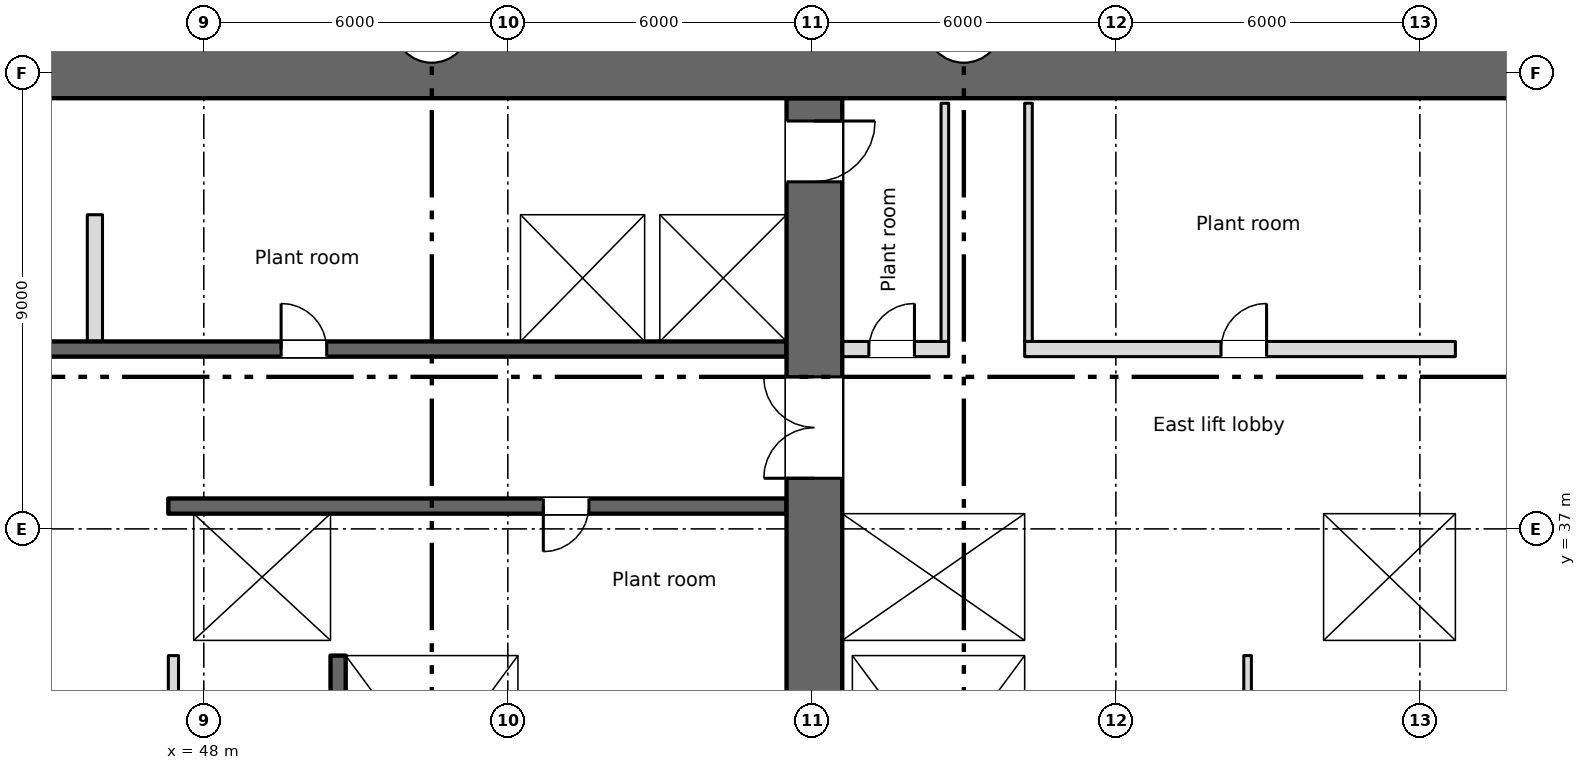
"""IFC4 building model, lengths in metres.
Left out: names, types, materials, properties, quantities, classifications, styles, units other than length and angle.
Written with IfcOpenShell. Run it as: python <this file> out.ifc"""

import sys

from ifc_helpers import new_model, si_unit, direction, frame, frame_2d, origin, place, context, subcontext, project, spatial, rectangle, extrude, element, fill, save


model = new_model("IFC4")
c1 = context("Model", 3, precision=1e-05, world=origin(), true_north=direction((0.0, 1.0)))
c2 = subcontext(c1, "Body", "Model", "MODEL_VIEW")
j1 = project(units=[si_unit("LENGTHUNIT", "METRE"), si_unit("PLANEANGLEUNIT", "RADIAN")], contexts=[c1])
p1 = place(None, origin())
s1 = spatial("IfcSite", under=j1, at=p1, CompositionType="ELEMENT")
p2 = place(p1, origin())
s2 = spatial("IfcBuilding", under=s1, at=p2, CompositionType="ELEMENT")
p3 = place(p2, frame((0.0, 0.0, -6.0)))
s3 = spatial("IfcBuildingStorey", under=s2, at=p3, CompositionType="ELEMENT", Elevation=-6.0)
p4 = place(p3, frame((-2.0, 46.0, 0.0), z_axis=(0.0, 0.0, 1.0), x_axis=(1.0, 0.0, 0.0)))
e1 = element("IfcWall", 1, at=p4, inside=s3, PredefinedType="SOLIDWALL", context=c2, shape_type="SweptSolid", body=[
    extrude(rectangle(XDim=82.0, YDim=1.0, at=frame_2d((41.0, 0.0))), origin(), (0.0, 0.0, 1.0), 5.55),
])
p5 = place(p3, frame((72.85, 28.4, 0.0), z_axis=(0.0, 0.0, 1.0), x_axis=(0.0, 1.0, 0.0)))
e2 = element("IfcWall", 2, at=p5, inside=s3, PredefinedType="SHEAR", context=c2, shape_type="SweptSolid", body=[
    extrude(rectangle(XDim=17.1, YDim=0.3, at=frame_2d((8.55, 0.0))), origin(), (0.0, 0.0, 1.0), 5.55),
])
p6 = place(p3, frame((64.35, 34.8, 0.0), z_axis=(0.0, 0.0, 1.0), x_axis=(0.0, 1.0, 0.0)))
e3 = element("IfcWall", 3, at=p6, inside=s3, PredefinedType="SHEAR", context=c2, shape_type="SweptSolid", body=[
    extrude(rectangle(XDim=2.5, YDim=0.3, at=frame_2d((1.25, 0.0))), origin(), (0.0, 0.0, 1.0), 5.55),
])
p7 = place(p3, frame((60.05, 28.4, 0.0), z_axis=(0.0, 0.0, 1.0), x_axis=(0.0, 1.0, 0.0)))
e4 = element("IfcWall", 4, at=p7, inside=s3, PredefinedType="SHEAR", context=c2, shape_type="SweptSolid", body=[
    extrude(rectangle(XDim=17.1, YDim=1.1, at=frame_2d((8.55, 0.0))), origin(), (0.0, 0.0, 1.0), 5.55),
])
p8 = place(p7, frame((9.6, 0.0, 0.0)))
e5 = element("IfcOpeningElement", 5, at=p8, cuts=e4, PredefinedType="OPENING", context=c2, shape_type="SweptSolid", body=[
    extrude(rectangle(XDim=2.0, YDim=2.1, at=frame_2d((1.0, 1.05))), frame((0.0, 0.56, 0.0), z_axis=(0.0, -1.0, 0.0), x_axis=(1.0, 0.0, 0.0)), (0.0, 0.0, 1.0), 1.12),
])
p9 = place(p7, frame((15.45, 0.0, 0.0)))
e6 = element("IfcOpeningElement", 6, at=p9, cuts=e4, PredefinedType="OPENING", context=c2, shape_type="SweptSolid", body=[
    extrude(rectangle(XDim=1.2, YDim=2.1, at=frame_2d((0.6, 1.05))), frame((0.0, 0.56, 0.0), z_axis=(0.0, -1.0, 0.0), x_axis=(1.0, 0.0, 0.0)), (0.0, 0.0, 1.0), 1.12),
])
p10 = place(p3, frame((50.65, 34.5, 0.0), z_axis=(0.0, 0.0, 1.0), x_axis=(0.0, -1.0, 0.0)))
e7 = element("IfcWall", 7, at=p10, inside=s3, PredefinedType="SHEAR", context=c2, shape_type="SweptSolid", body=[
    extrude(rectangle(XDim=6.1, YDim=0.3, at=frame_2d((3.05, 0.0))), origin(), (0.0, 0.0, 1.0), 5.55),
])
p11 = place(p10, frame((4.95, 0.0, 0.0)))
e8 = element("IfcOpeningElement", 8, at=p11, cuts=e7, PredefinedType="OPENING", context=c2, shape_type="SweptSolid", body=[
    extrude(rectangle(XDim=1.1, YDim=2.1, at=frame_2d((0.55, 1.05))), frame((0.0, 0.16, 0.0), z_axis=(0.0, -1.0, 0.0), x_axis=(1.0, 0.0, 0.0)), (0.0, 0.0, 1.0), 0.32),
])
p12 = place(p3, frame((54.35, 28.4, 0.0), z_axis=(0.0, 0.0, 1.0), x_axis=(0.0, 1.0, 0.0)))
e9 = element("IfcWall", 9, at=p12, inside=s3, PredefinedType="SHEAR", context=c2, shape_type="SweptSolid", body=[
    extrude(rectangle(XDim=6.1, YDim=0.3, at=frame_2d((3.05, 0.0))), origin(), (0.0, 0.0, 1.0), 5.55),
])
p13 = place(p3, frame((60.7, 28.4, 0.0), z_axis=(0.0, 0.0, 1.0), x_axis=(0.0, 1.0, 0.0)))
e10 = element("IfcWall", 10, at=p13, inside=s3, PredefinedType="SHEAR", context=c2, shape_type="SweptSolid", body=[
    extrude(rectangle(XDim=6.1, YDim=0.2, at=frame_2d((3.05, 0.0))), origin(), (0.0, 0.0, 1.0), 5.55),
])
p14 = place(p3, frame((64.35, 28.4, 0.0), z_axis=(0.0, 0.0, 1.0), x_axis=(0.0, 1.0, 0.0)))
e11 = element("IfcWall", 11, at=p14, inside=s3, PredefinedType="SHEAR", context=c2, shape_type="SweptSolid", body=[
    extrude(rectangle(XDim=6.1, YDim=0.3, at=frame_2d((3.05, 0.0))), origin(), (0.0, 0.0, 1.0), 5.55),
])
p15 = place(p3, frame((47.3, 34.65, 0.0), z_axis=(0.0, 0.0, 1.0), x_axis=(1.0, 0.0, 0.0)))
e12 = element("IfcWall", 12, at=p15, inside=s3, PredefinedType="SHEAR", context=c2, shape_type="SweptSolid", body=[
    extrude(rectangle(XDim=12.2, YDim=0.3, at=frame_2d((6.1, 0.0))), origin(), (0.0, 0.0, 1.0), 5.55),
])
p16 = place(p15, frame((1.3, 0.0, 0.0)))
e13 = element("IfcOpeningElement", 13, at=p16, cuts=e12, PredefinedType="OPENING", context=c2, shape_type="SweptSolid", body=[
    extrude(rectangle(XDim=1.1, YDim=2.1, at=frame_2d((0.55, 1.05))), frame((0.0, 0.16, 0.0), z_axis=(0.0, -1.0, 0.0), x_axis=(1.0, 0.0, 0.0)), (0.0, 0.0, 1.0), 0.32),
])
p17 = place(p3, frame((60.6, 34.65, 0.0), z_axis=(0.0, 0.0, 1.0), x_axis=(1.0, 0.0, 0.0)))
e14 = element("IfcWall", 14, at=p17, inside=s3, PredefinedType="SHEAR", context=c2, shape_type="SweptSolid", body=[
    extrude(rectangle(XDim=12.1, YDim=0.3, at=frame_2d((6.05, 0.0))), origin(), (0.0, 0.0, 1.0), 5.55),
])
p18 = place(p3, frame((59.5, 37.45, 0.0), z_axis=(0.0, 0.0, 1.0), x_axis=(-1.0, 0.0, 0.0)))
e15 = element("IfcWall", 15, at=p18, inside=s3, PredefinedType="SHEAR", context=c2, shape_type="SweptSolid", body=[
    extrude(rectangle(XDim=12.2, YDim=0.3, at=frame_2d((6.1, 0.0))), origin(), (0.0, 0.0, 1.0), 5.55),
])
p19 = place(p18, frame((3.9, 0.0, 0.0)))
e16 = element("IfcOpeningElement", 16, at=p19, cuts=e15, PredefinedType="OPENING", context=c2, shape_type="SweptSolid", body=[
    extrude(rectangle(XDim=0.9, YDim=2.1, at=frame_2d((0.45, 1.05))), frame((0.0, 0.16, 0.0), z_axis=(0.0, -1.0, 0.0), x_axis=(1.0, 0.0, 0.0)), (0.0, 0.0, 1.0), 0.32),
])
p20 = place(p3, frame((60.6, 37.45, 0.0), z_axis=(0.0, 0.0, 1.0), x_axis=(1.0, 0.0, 0.0)))
e17 = element("IfcWall", 17, at=p20, inside=s3, PredefinedType="SHEAR", context=c2, shape_type="SweptSolid", body=[
    extrude(rectangle(XDim=12.1, YDim=0.3, at=frame_2d((6.05, 0.0))), origin(), (0.0, 0.0, 1.0), 5.55),
])
p21 = place(p20, frame((1.25, 0.0, 0.0)))
e18 = element("IfcOpeningElement", 18, at=p21, cuts=e17, PredefinedType="OPENING", context=c2, shape_type="SweptSolid", body=[
    extrude(rectangle(XDim=1.1, YDim=2.1, at=frame_2d((0.55, 1.05))), frame((0.0, 0.16, 0.0), z_axis=(0.0, -1.0, 0.0), x_axis=(1.0, 0.0, 0.0)), (0.0, 0.0, 1.0), 0.32),
])
p22 = place(p20, frame((4.6, 0.0, 0.0)))
e19 = element("IfcOpeningElement", 19, at=p22, cuts=e17, PredefinedType="OPENING", context=c2, shape_type="SweptSolid", body=[
    extrude(rectangle(XDim=1.1, YDim=2.1, at=frame_2d((0.55, 1.05))), frame((0.0, 0.16, 0.0), z_axis=(0.0, -1.0, 0.0), x_axis=(1.0, 0.0, 0.0)), (0.0, 0.0, 1.0), 0.32),
])
p23 = place(p20, frame((7.4, 0.0, 0.0)))
e20 = element("IfcOpeningElement", 20, at=p23, cuts=e17, PredefinedType="OPENING", context=c2, shape_type="SweptSolid", body=[
    extrude(rectangle(XDim=1.1, YDim=2.1, at=frame_2d((0.55, 1.05))), frame((0.0, 0.16, 0.0), z_axis=(0.0, -1.0, 0.0), x_axis=(1.0, 0.0, 0.0)), (0.0, 0.0, 1.0), 0.32),
])
p24 = place(p20, frame((10.25, 0.0, 0.0)))
e21 = element("IfcOpeningElement", 21, at=p24, cuts=e17, PredefinedType="OPENING", context=c2, shape_type="SweptSolid", body=[
    extrude(rectangle(XDim=1.1, YDim=2.1, at=frame_2d((0.55, 1.05))), frame((0.0, 0.16, 0.0), z_axis=(0.0, -1.0, 0.0), x_axis=(1.0, 0.0, 0.0)), (0.0, 0.0, 1.0), 0.32),
])
p25 = place(p3, frame((47.55, 34.8, 0.0), z_axis=(0.0, 0.0, 1.0), x_axis=(0.0, 1.0, 0.0)))
e22 = element("IfcWall", 22, at=p25, inside=s3, PredefinedType="SHEAR", context=c2, shape_type="SweptSolid", body=[
    extrude(rectangle(XDim=2.5, YDim=0.5, at=frame_2d((1.25, 0.0))), origin(), (0.0, 0.0, 1.0), 5.55),
])
p26 = place(p3, frame((50.65, 34.8, 0.0), z_axis=(0.0, 0.0, 1.0), x_axis=(0.0, 1.0, 0.0)))
e23 = element("IfcWall", 23, at=p26, inside=s3, PredefinedType="SHEAR", context=c2, shape_type="SweptSolid", body=[
    extrude(rectangle(XDim=2.5, YDim=0.3, at=frame_2d((1.25, 0.0))), origin(), (0.0, 0.0, 1.0), 5.55),
])
p27 = place(p3, frame((18.5, 40.55, 0.0), z_axis=(0.0, 0.0, 1.0), x_axis=(1.0, 0.0, 0.0)))
e24 = element("IfcWall", 24, at=p27, inside=s3, PredefinedType="SHEAR", context=c2, shape_type="SweptSolid", body=[
    extrude(rectangle(XDim=41.0, YDim=0.3, at=frame_2d((20.5, 0.0))), origin(), (0.0, 0.0, 1.0), 5.55),
])
p28 = place(p27, frame((2.15, 0.0, 0.0)))
e25 = element("IfcOpeningElement", 25, at=p28, cuts=e24, PredefinedType="OPENING", context=c2, shape_type="SweptSolid", body=[
    extrude(rectangle(XDim=0.9, YDim=2.1, at=frame_2d((0.45, 1.05))), frame((0.0, 0.16, 0.0), z_axis=(0.0, -1.0, 0.0), x_axis=(1.0, 0.0, 0.0)), (0.0, 0.0, 1.0), 0.32),
])
p29 = place(p27, frame((7.65, 0.0, 0.0)))
e26 = element("IfcOpeningElement", 26, at=p29, cuts=e24, PredefinedType="OPENING", context=c2, shape_type="SweptSolid", body=[
    extrude(rectangle(XDim=0.9, YDim=2.1, at=frame_2d((0.45, 1.05))), frame((0.0, 0.16, 0.0), z_axis=(0.0, -1.0, 0.0), x_axis=(1.0, 0.0, 0.0)), (0.0, 0.0, 1.0), 0.32),
])
p30 = place(p27, frame((13.15, 0.0, 0.0)))
e27 = element("IfcOpeningElement", 27, at=p30, cuts=e24, PredefinedType="OPENING", context=c2, shape_type="SweptSolid", body=[
    extrude(rectangle(XDim=0.9, YDim=2.1, at=frame_2d((0.45, 1.05))), frame((0.0, 0.16, 0.0), z_axis=(0.0, -1.0, 0.0), x_axis=(1.0, 0.0, 0.0)), (0.0, 0.0, 1.0), 0.32),
])
p31 = place(p27, frame((18.65, 0.0, 0.0)))
e28 = element("IfcOpeningElement", 28, at=p31, cuts=e24, PredefinedType="OPENING", context=c2, shape_type="SweptSolid", body=[
    extrude(rectangle(XDim=0.9, YDim=2.1, at=frame_2d((0.45, 1.05))), frame((0.0, 0.16, 0.0), z_axis=(0.0, -1.0, 0.0), x_axis=(1.0, 0.0, 0.0)), (0.0, 0.0, 1.0), 0.32),
])
p32 = place(p27, frame((24.15, 0.0, 0.0)))
e29 = element("IfcOpeningElement", 29, at=p32, cuts=e24, PredefinedType="OPENING", context=c2, shape_type="SweptSolid", body=[
    extrude(rectangle(XDim=0.9, YDim=2.1, at=frame_2d((0.45, 1.05))), frame((0.0, 0.16, 0.0), z_axis=(0.0, -1.0, 0.0), x_axis=(1.0, 0.0, 0.0)), (0.0, 0.0, 1.0), 0.32),
])
p33 = place(p27, frame((31.025, 0.0, 0.0)))
e30 = element("IfcOpeningElement", 30, at=p33, cuts=e24, PredefinedType="OPENING", context=c2, shape_type="SweptSolid", body=[
    extrude(rectangle(XDim=0.9, YDim=2.1, at=frame_2d((0.45, 1.05))), frame((0.0, 0.16, 0.0), z_axis=(0.0, -1.0, 0.0), x_axis=(1.0, 0.0, 0.0)), (0.0, 0.0, 1.0), 0.32),
])
p34 = place(p27, frame((36.375, 0.0, 0.0)))
e31 = element("IfcOpeningElement", 31, at=p34, cuts=e24, PredefinedType="OPENING", context=c2, shape_type="SweptSolid", body=[
    extrude(rectangle(XDim=1.2, YDim=2.1, at=frame_2d((0.6, 1.05))), frame((0.0, 0.16, 0.0), z_axis=(0.0, -1.0, 0.0), x_axis=(1.0, 0.0, 0.0)), (0.0, 0.0, 1.0), 0.32),
])
p35 = place(p27, frame((39.15, 0.0, 0.0)))
e32 = element("IfcOpeningElement", 32, at=p35, cuts=e24, PredefinedType="OPENING", context=c2, shape_type="SweptSolid", body=[
    extrude(rectangle(XDim=1.2, YDim=2.1, at=frame_2d((0.6, 1.05))), frame((0.0, 0.16, 0.0), z_axis=(0.0, -1.0, 0.0), x_axis=(1.0, 0.0, 0.0)), (0.0, 0.0, 1.0), 0.32),
])
p36 = place(p3, frame((18.5, 43.35, 0.0), z_axis=(0.0, 0.0, 1.0), x_axis=(1.0, 0.0, 0.0)))
e33 = element("IfcWall", 33, at=p36, inside=s3, PredefinedType="SHEAR", context=c2, shape_type="SweptSolid", body=[
    extrude(rectangle(XDim=41.0, YDim=0.3, at=frame_2d((20.5, 0.0))), origin(), (0.0, 0.0, 1.0), 5.55),
])
p37 = place(p3, frame((60.6, 40.55, 0.0), z_axis=(0.0, 0.0, 1.0), x_axis=(1.0, 0.0, 0.0)))
e34 = element("IfcWall", 34, at=p37, inside=s3, PredefinedType="PARTITIONING", context=c2, shape_type="SweptSolid", body=[
    extrude(rectangle(XDim=2.1, YDim=0.3, at=frame_2d((1.05, 0.0))), origin(), (0.0, 0.0, 1.0), 5.55),
])
p38 = place(p37, frame((0.525, 0.0, 0.0)))
e35 = element("IfcOpeningElement", 35, at=p38, cuts=e34, PredefinedType="OPENING", context=c2, shape_type="SweptSolid", body=[
    extrude(rectangle(XDim=0.9, YDim=2.1, at=frame_2d((0.45, 1.05))), frame((0.0, 0.16, 0.0), z_axis=(0.0, -1.0, 0.0), x_axis=(1.0, 0.0, 0.0)), (0.0, 0.0, 1.0), 0.32),
])
p39 = place(p3, frame((64.2, 40.55, 0.0), z_axis=(0.0, 0.0, 1.0), x_axis=(1.0, 0.0, 0.0)))
e36 = element("IfcWall", 36, at=p39, inside=s3, PredefinedType="PARTITIONING", context=c2, shape_type="SweptSolid", body=[
    extrude(rectangle(XDim=8.5, YDim=0.3, at=frame_2d((4.25, 0.0))), origin(), (0.0, 0.0, 1.0), 5.55),
])
p40 = place(p39, frame((3.875, 0.0, 0.0)))
e37 = element("IfcOpeningElement", 37, at=p40, cuts=e36, PredefinedType="OPENING", context=c2, shape_type="SweptSolid", body=[
    extrude(rectangle(XDim=0.9, YDim=2.1, at=frame_2d((0.45, 1.05))), frame((0.0, 0.16, 0.0), z_axis=(0.0, -1.0, 0.0), x_axis=(1.0, 0.0, 0.0)), (0.0, 0.0, 1.0), 0.32),
])
for number, where, z_axis, x_axis in (
    (38, (54.1, 40.7, 0.0), (0.0, 0.0, 1.0), (0.0, 1.0, 0.0)),
    (39, (56.85, 40.7, 0.0), (0.0, 0.0, 1.0), (0.0, 1.0, 0.0)),
    (40, (67.15, 34.8, 0.0), (0.0, 0.0, 1.0), (0.0, 1.0, 0.0)),
    (41, (69.95, 34.8, 0.0), (0.0, 0.0, 1.0), (0.0, 1.0, 0.0)),
):
    element("IfcWall", number, at=place(p3, frame(where, z_axis=z_axis, x_axis=x_axis)), inside=s3, PredefinedType="SHEAR", context=c2, shape_type="SweptSolid", body=[
        extrude(rectangle(XDim=2.5, YDim=0.3, at=frame_2d((1.25, 0.0))), origin(), (0.0, 0.0, 1.0), 5.55),
    ])
p41 = place(p3, frame((47.4, 28.4, 0.0), z_axis=(0.0, 0.0, 1.0), x_axis=(0.0, 1.0, 0.0)))
e42 = element("IfcWall", 42, at=p41, inside=s3, PredefinedType="PARTITIONING", context=c2, shape_type="SweptSolid", body=[
    extrude(rectangle(XDim=6.1, YDim=0.2, at=frame_2d((3.05, 0.0))), origin(), (0.0, 0.0, 1.0), 5.55),
])
for number, where, z_axis, x_axis in (
    (43, (62.625, 40.7, 0.0), (0.0, 0.0, 1.0), (0.0, 1.0, 0.0)),
    (44, (64.275, 40.7, 0.0), (0.0, 0.0, 1.0), (0.0, 1.0, 0.0)),
):
    element("IfcWall", number, at=place(p3, frame(where, z_axis=z_axis, x_axis=x_axis)), inside=s3, PredefinedType="PARTITIONING", context=c2, shape_type="SweptSolid", body=[
        extrude(rectangle(XDim=4.7, YDim=0.15, at=frame_2d((2.35, 0.0))), origin(), (0.0, 0.0, 1.0), 5.55),
    ])
p42 = place(p3, frame((68.6, 28.4, 0.0), z_axis=(0.0, 0.0, 1.0), x_axis=(0.0, 1.0, 0.0)))
e45 = element("IfcWall", 45, at=p42, inside=s3, PredefinedType="PARTITIONING", context=c2, shape_type="SweptSolid", body=[
    extrude(rectangle(XDim=6.1, YDim=0.15, at=frame_2d((3.05, 0.0))), origin(), (0.0, 0.0, 1.0), 5.55),
])
p43 = place(p3, frame((45.85, 40.7, 0.0), z_axis=(0.0, 0.0, 1.0), x_axis=(0.0, 1.0, 0.0)))
e46 = element("IfcWall", 46, at=p43, inside=s3, PredefinedType="PARTITIONING", context=c2, shape_type="SweptSolid", body=[
    extrude(rectangle(XDim=2.5, YDim=0.3, at=frame_2d((1.25, 0.0))), origin(), (0.0, 0.0, 1.0), 5.55),
])
p44 = place(p38, origin())
e47 = element("IfcDoor", 47, at=p44, inside=s3, OperationType="SINGLE_SWING_RIGHT", PredefinedType="DOOR", context=c2, shape_type="SweptSolid", body=[
    extrude(rectangle(XDim=0.9, YDim=2.1, at=frame_2d((0.45, 1.05))), frame((0.0, 0.025, 0.0), z_axis=(0.0, -1.0, 0.0), x_axis=(1.0, 0.0, 0.0)), (0.0, 0.0, 1.0), 0.05),
])
fill(e35, e47)
p45 = place(p40, origin())
e48 = element("IfcDoor", 48, at=p45, inside=s3, OperationType="SINGLE_SWING_RIGHT", PredefinedType="DOOR", context=c2, shape_type="SweptSolid", body=[
    extrude(rectangle(XDim=0.9, YDim=2.1, at=frame_2d((0.45, 1.05))), frame((0.0, 0.025, 0.0), z_axis=(0.0, -1.0, 0.0), x_axis=(1.0, 0.0, 0.0)), (0.0, 0.0, 1.0), 0.05),
])
fill(e37, e48)
p46 = place(p19, origin())
e49 = element("IfcDoor", 49, at=p46, inside=s3, OperationType="SINGLE_SWING_RIGHT", PredefinedType="DOOR", context=c2, shape_type="SweptSolid", body=[
    extrude(rectangle(XDim=0.9, YDim=2.1, at=frame_2d((0.45, 1.05))), frame((0.0, 0.025, 0.0), z_axis=(0.0, -1.0, 0.0), x_axis=(1.0, 0.0, 0.0)), (0.0, 0.0, 1.0), 0.05),
])
fill(e16, e49)
p47 = place(p33, origin())
e50 = element("IfcDoor", 50, at=p47, inside=s3, OperationType="SINGLE_SWING_LEFT", PredefinedType="DOOR", context=c2, shape_type="SweptSolid", body=[
    extrude(rectangle(XDim=0.9, YDim=2.1, at=frame_2d((0.45, 1.05))), frame((0.0, 0.025, 0.0), z_axis=(0.0, -1.0, 0.0), x_axis=(1.0, 0.0, 0.0)), (0.0, 0.0, 1.0), 0.05),
])
fill(e30, e50)
p48 = place(p34, origin())
e51 = element("IfcDoor", 51, at=p48, inside=s3, OperationType="SLIDING_TO_LEFT", PredefinedType="DOOR", context=c2, shape_type="SweptSolid", body=[
    extrude(rectangle(XDim=1.2, YDim=2.1, at=frame_2d((0.6, 1.05))), frame((0.0, 0.025, 0.0), z_axis=(0.0, -1.0, 0.0), x_axis=(1.0, 0.0, 0.0)), (0.0, 0.0, 1.0), 0.05),
])
fill(e31, e51)
p49 = place(p35, origin())
e52 = element("IfcDoor", 52, at=p49, inside=s3, OperationType="SLIDING_TO_LEFT", PredefinedType="DOOR", context=c2, shape_type="SweptSolid", body=[
    extrude(rectangle(XDim=1.2, YDim=2.1, at=frame_2d((0.6, 1.05))), frame((0.0, 0.025, 0.0), z_axis=(0.0, -1.0, 0.0), x_axis=(1.0, 0.0, 0.0)), (0.0, 0.0, 1.0), 0.05),
])
fill(e32, e52)
p50 = place(p21, origin())
e53 = element("IfcDoor", 53, at=p50, inside=s3, OperationType="SLIDING_TO_LEFT", PredefinedType="DOOR", context=c2, shape_type="SweptSolid", body=[
    extrude(rectangle(XDim=1.1, YDim=2.1, at=frame_2d((0.55, 1.05))), frame((0.0, 0.025, 0.0), z_axis=(0.0, -1.0, 0.0), x_axis=(1.0, 0.0, 0.0)), (0.0, 0.0, 1.0), 0.05),
])
fill(e18, e53)
p51 = place(p22, origin())
e54 = element("IfcDoor", 54, at=p51, inside=s3, OperationType="SLIDING_TO_LEFT", PredefinedType="DOOR", context=c2, shape_type="SweptSolid", body=[
    extrude(rectangle(XDim=1.1, YDim=2.1, at=frame_2d((0.55, 1.05))), frame((0.0, 0.025, 0.0), z_axis=(0.0, -1.0, 0.0), x_axis=(1.0, 0.0, 0.0)), (0.0, 0.0, 1.0), 0.05),
])
fill(e19, e54)
p52 = place(p23, origin())
e55 = element("IfcDoor", 55, at=p52, inside=s3, OperationType="SLIDING_TO_LEFT", PredefinedType="DOOR", context=c2, shape_type="SweptSolid", body=[
    extrude(rectangle(XDim=1.1, YDim=2.1, at=frame_2d((0.55, 1.05))), frame((0.0, 0.025, 0.0), z_axis=(0.0, -1.0, 0.0), x_axis=(1.0, 0.0, 0.0)), (0.0, 0.0, 1.0), 0.05),
])
fill(e20, e55)
p53 = place(p24, origin())
e56 = element("IfcDoor", 56, at=p53, inside=s3, OperationType="SLIDING_TO_LEFT", PredefinedType="DOOR", context=c2, shape_type="SweptSolid", body=[
    extrude(rectangle(XDim=1.1, YDim=2.1, at=frame_2d((0.55, 1.05))), frame((0.0, 0.025, 0.0), z_axis=(0.0, -1.0, 0.0), x_axis=(1.0, 0.0, 0.0)), (0.0, 0.0, 1.0), 0.05),
])
fill(e21, e56)
p54 = place(p16, origin())
e57 = element("IfcDoor", 57, at=p54, inside=s3, OperationType="SLIDING_TO_LEFT", PredefinedType="DOOR", context=c2, shape_type="SweptSolid", body=[
    extrude(rectangle(XDim=1.1, YDim=2.1, at=frame_2d((0.55, 1.05))), frame((0.0, 0.025, 0.0), z_axis=(0.0, -1.0, 0.0), x_axis=(1.0, 0.0, 0.0)), (0.0, 0.0, 1.0), 0.05),
])
fill(e13, e57)
p55 = place(p8, origin())
e58 = element("IfcDoor", 58, at=p55, inside=s3, OperationType="DOUBLE_DOOR_SINGLE_SWING", PredefinedType="DOOR", context=c2, shape_type="SweptSolid", body=[
    extrude(rectangle(XDim=2.0, YDim=2.1, at=frame_2d((1.0, 1.05))), frame((0.0, 0.025, 0.0), z_axis=(0.0, -1.0, 0.0), x_axis=(1.0, 0.0, 0.0)), (0.0, 0.0, 1.0), 0.05),
])
fill(e5, e58)
p56 = place(p9, origin())
e59 = element("IfcDoor", 59, at=p56, inside=s3, OperationType="SINGLE_SWING_RIGHT", PredefinedType="DOOR", context=c2, shape_type="SweptSolid", body=[
    extrude(rectangle(XDim=1.2, YDim=2.1, at=frame_2d((0.6, 1.05))), frame((0.0, 0.025, 0.0), z_axis=(0.0, -1.0, 0.0), x_axis=(1.0, 0.0, 0.0)), (0.0, 0.0, 1.0), 0.05),
])
fill(e6, e59)
save(model, sys.argv[1])
